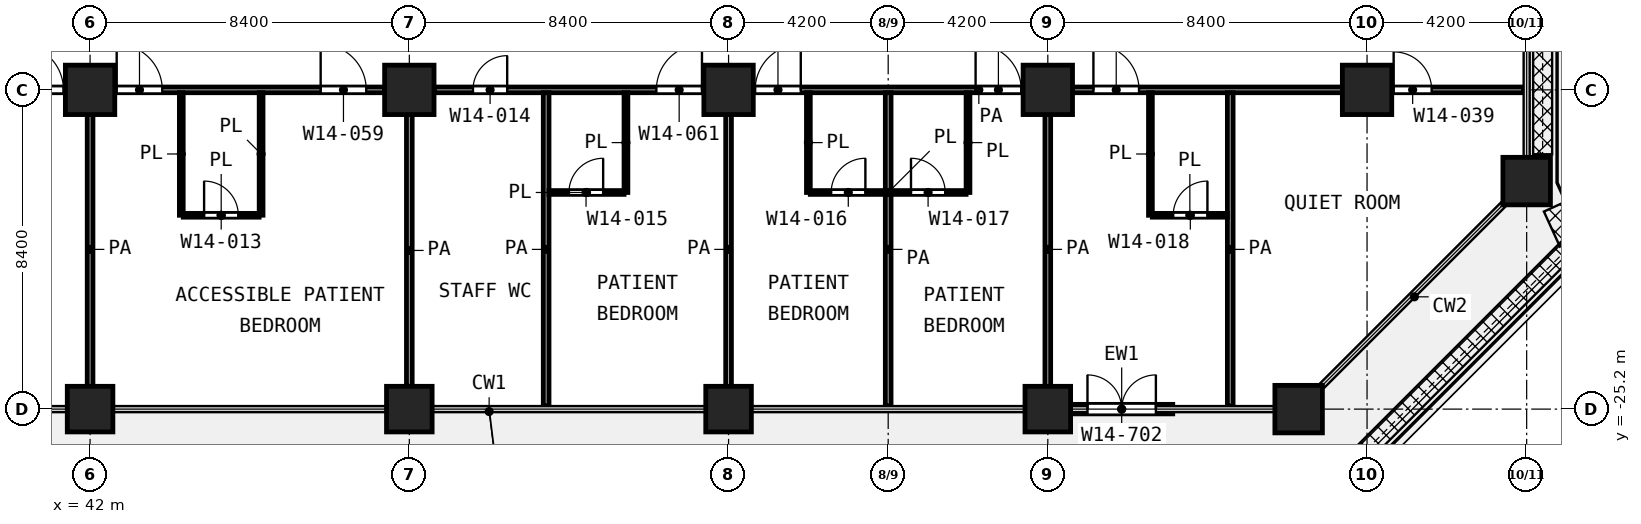
"""IFC4 building model, lengths in metres.
Left out: names, types, materials, properties, quantities, classifications, styles, units other than length and angle.
Written with IfcOpenShell. Run it as: python <this file> out.ifc"""

import sys

from ifc_helpers import new_model, si_unit, direction, frame, frame_2d, origin, origin_2d, place, context, subcontext, project, spatial, rectangle, extrude, element, fill, save


model = new_model("IFC4")
c1 = context("Model", 3, precision=1e-05, world=origin(), true_north=direction((0.0, 1.0)))
c2 = subcontext(c1, "Body", "Model", "MODEL_VIEW")
j1 = project(units=[si_unit("LENGTHUNIT", "METRE"), si_unit("PLANEANGLEUNIT", "RADIAN")], contexts=[c1])
p1 = place(None, origin())
s1 = spatial("IfcSite", under=j1, at=p1, CompositionType="ELEMENT")
p2 = place(p1, origin())
s2 = spatial("IfcBuilding", under=s1, at=p2, CompositionType="ELEMENT")
p3 = place(p2, frame((0.0, 0.0, 64.4)))
s3 = spatial("IfcBuildingStorey", under=s2, at=p3, CompositionType="ELEMENT", Elevation=64.4)
for number, where, z_axis, x_axis in (
    (1, (42.0, -16.8, 0.0), (0.0, 0.0, 1.0), (1.0, 0.0, 0.0)),
    (2, (50.4, -16.8, 0.0), (0.0, 0.0, 1.0), (1.0, 0.0, 0.0)),
    (3, (58.8, -16.8, 0.0), (0.0, 0.0, 1.0), (1.0, 0.0, 0.0)),
    (4, (67.2, -16.8, 0.0), (0.0, 0.0, 1.0), (1.0, 0.0, 0.0)),
    (5, (75.6, -16.8, 0.0), (0.0, 0.0, 1.0), (1.0, 0.0, 0.0)),
):
    element("IfcColumn", number, at=place(p3, frame(where, z_axis=z_axis, x_axis=x_axis)), inside=s3, PredefinedType="COLUMN", context=c2, shape_type="SweptSolid", body=[
        extrude(rectangle(XDim=1.3, YDim=1.3, at=origin_2d()), origin(), (0.0, 0.0, 1.0), 4.2),
    ])
p4 = place(p3, frame((79.8, -19.2, 0.0), z_axis=(0.0, 0.0, 1.0), x_axis=(1.0, 0.0, 0.0)))
e6 = element("IfcColumn", 6, at=p4, inside=s3, PredefinedType="COLUMN", context=c2, shape_type="SweptSolid", body=[
    extrude(rectangle(XDim=1.25, YDim=1.25, at=origin_2d()), origin(), (0.0, 0.0, 1.0), 4.2),
])
for number, where, z_axis, x_axis in (
    (7, (42.0, -25.2, 0.0), (0.0, 0.0, 1.0), (1.0, 0.0, 0.0)),
    (8, (50.4, -25.2, 0.0), (0.0, 0.0, 1.0), (1.0, 0.0, 0.0)),
    (9, (58.8, -25.2, 0.0), (0.0, 0.0, 1.0), (1.0, 0.0, 0.0)),
    (10, (67.2, -25.2, 0.0), (0.0, 0.0, 1.0), (1.0, 0.0, 0.0)),
):
    element("IfcColumn", number, at=place(p3, frame(where, z_axis=z_axis, x_axis=x_axis)), inside=s3, PredefinedType="COLUMN", context=c2, shape_type="SweptSolid", body=[
        extrude(rectangle(XDim=1.2, YDim=1.2, at=origin_2d()), origin(), (0.0, 0.0, 1.0), 4.2),
    ])
p5 = place(p3, frame((73.8, -25.2, 0.0), z_axis=(0.0, 0.0, 1.0), x_axis=(1.0, 0.0, 0.0)))
e11 = element("IfcColumn", 11, at=p5, inside=s3, PredefinedType="COLUMN", context=c2, shape_type="SweptSolid", body=[
    extrude(rectangle(XDim=1.25, YDim=1.25, at=origin_2d()), origin(), (0.0, 0.0, 1.0), 4.2),
])
p6 = place(p3, frame((67.8, -25.2, 0.0), z_axis=(0.0, 0.0, 1.0), x_axis=(1.0, 0.0, 0.0)))
e12 = element("IfcWall", 12, at=p6, inside=s3, PredefinedType="SOLIDWALL", context=c2, shape_type="SweptSolid", body=[
    extrude(rectangle(XDim=2.688, YDim=0.25, at=frame_2d((1.344, 0.0))), origin(), (0.0, 0.0, 1.0), 3.78),
])
p7 = place(p6, frame((0.444, 0.0, 0.0)))
e13 = element("IfcOpeningElement", 13, at=p7, cuts=e12, PredefinedType="OPENING", context=c2, shape_type="SweptSolid", body=[
    extrude(rectangle(XDim=1.8, YDim=2.1, at=frame_2d((0.9, 1.05))), frame((0.0, 0.135, 0.0), z_axis=(0.0, -1.0, 0.0), x_axis=(1.0, 0.0, 0.0)), (0.0, 0.0, 1.0), 0.27),
])
p8 = place(p3, frame((44.452, -20.1, 0.0), z_axis=(0.0, 0.0, 1.0), x_axis=(1.0, 0.0, 0.0)))
e14 = element("IfcWall", 14, at=p8, inside=s3, PredefinedType="PARTITIONING", context=c2, shape_type="SweptSolid", body=[
    extrude(rectangle(XDim=1.996, YDim=0.1, at=frame_2d((0.998, 0.0))), origin(), (0.0, 0.0, 1.0), 3.9),
])
p9 = place(p8, frame((0.548, 0.0, 0.0)))
e15 = element("IfcOpeningElement", 15, at=p9, cuts=e14, PredefinedType="OPENING", context=c2, shape_type="SweptSolid", body=[
    extrude(rectangle(XDim=0.9, YDim=2.1, at=frame_2d((0.45, 1.05))), frame((0.0, 0.06, 0.0), z_axis=(0.0, -1.0, 0.0), x_axis=(1.0, 0.0, 0.0)), (0.0, 0.0, 1.0), 0.12),
])
p10 = place(p3, frame((69.95, -20.1, 0.0), z_axis=(0.0, 0.0, 1.0), x_axis=(1.0, 0.0, 0.0)))
e16 = element("IfcWall", 16, at=p10, inside=s3, PredefinedType="PARTITIONING", context=c2, shape_type="SweptSolid", body=[
    extrude(rectangle(XDim=1.975, YDim=0.1, at=frame_2d((0.988, 0.0))), origin(), (0.0, 0.0, 1.0), 3.9),
])
p11 = place(p10, frame((0.55, 0.0, 0.0)))
e17 = element("IfcOpeningElement", 17, at=p11, cuts=e16, PredefinedType="OPENING", context=c2, shape_type="SweptSolid", body=[
    extrude(rectangle(XDim=0.9, YDim=2.1, at=frame_2d((0.45, 1.05))), frame((0.0, 0.06, 0.0), z_axis=(0.0, -1.0, 0.0), x_axis=(1.0, 0.0, 0.0)), (0.0, 0.0, 1.0), 0.12),
])
p12 = place(p3, frame((54.075, -19.5, 0.0), z_axis=(0.0, 0.0, 1.0), x_axis=(1.0, 0.0, 0.0)))
e18 = element("IfcWall", 18, at=p12, inside=s3, PredefinedType="PARTITIONING", context=c2, shape_type="SweptSolid", body=[
    extrude(rectangle(XDim=1.975, YDim=0.1, at=frame_2d((0.988, 0.0))), origin(), (0.0, 0.0, 1.0), 3.9),
])
p13 = place(p12, frame((0.525, 0.0, 0.0)))
e19 = element("IfcOpeningElement", 19, at=p13, cuts=e18, PredefinedType="OPENING", context=c2, shape_type="SweptSolid", body=[
    extrude(rectangle(XDim=0.9, YDim=2.1, at=frame_2d((0.45, 1.05))), frame((0.0, 0.06, 0.0), z_axis=(0.0, -1.0, 0.0), x_axis=(1.0, 0.0, 0.0)), (0.0, 0.0, 1.0), 0.12),
])
p14 = place(p3, frame((60.95, -19.5, 0.0), z_axis=(0.0, 0.0, 1.0), x_axis=(1.0, 0.0, 0.0)))
e20 = element("IfcWall", 20, at=p14, inside=s3, PredefinedType="PARTITIONING", context=c2, shape_type="SweptSolid", body=[
    extrude(rectangle(XDim=4.1, YDim=0.1, at=frame_2d((2.05, 0.0))), origin(), (0.0, 0.0, 1.0), 3.9),
])
p15 = place(p14, frame((0.55, 0.0, 0.0)))
e21 = element("IfcOpeningElement", 21, at=p15, cuts=e20, PredefinedType="OPENING", context=c2, shape_type="SweptSolid", body=[
    extrude(rectangle(XDim=0.9, YDim=2.1, at=frame_2d((0.45, 1.05))), frame((0.0, 0.06, 0.0), z_axis=(0.0, -1.0, 0.0), x_axis=(1.0, 0.0, 0.0)), (0.0, 0.0, 1.0), 0.12),
])
p16 = place(p14, frame((2.65, 0.0, 0.0)))
e22 = element("IfcOpeningElement", 22, at=p16, cuts=e20, PredefinedType="OPENING", context=c2, shape_type="SweptSolid", body=[
    extrude(rectangle(XDim=0.9, YDim=2.1, at=frame_2d((0.45, 1.05))), frame((0.0, 0.06, 0.0), z_axis=(0.0, -1.0, 0.0), x_axis=(1.0, 0.0, 0.0)), (0.0, 0.0, 1.0), 0.12),
])
p17 = place(p3, frame((44.4, -20.099, 0.0), z_axis=(0.0, 0.0, 1.0), x_axis=(0.0, 1.0, 0.0)))
e23 = element("IfcWall", 23, at=p17, inside=s3, PredefinedType="PARTITIONING", context=c2, shape_type="SweptSolid", body=[
    extrude(rectangle(XDim=3.224, YDim=0.1, at=frame_2d((1.612, 0.0))), origin(), (0.0, 0.0, 1.0), 3.9),
])
p18 = place(p3, frame((46.5, -20.098, 0.0), z_axis=(0.0, 0.0, 1.0), x_axis=(0.0, 1.0, 0.0)))
e24 = element("IfcWall", 24, at=p18, inside=s3, PredefinedType="PARTITIONING", context=c2, shape_type="SweptSolid", body=[
    extrude(rectangle(XDim=3.223, YDim=0.1, at=frame_2d((1.611, 0.0))), origin(), (0.0, 0.0, 1.0), 3.9),
])
for number, where, z_axis, x_axis in (
    (25, (56.1, -19.5, 0.0), (0.0, 0.0, 1.0), (0.0, 1.0, 0.0)),
    (26, (60.9, -19.5, 0.0), (0.0, 0.0, 1.0), (0.0, 1.0, 0.0)),
    (27, (65.1, -19.5, 0.0), (0.0, 0.0, 1.0), (0.0, 1.0, 0.0)),
):
    element("IfcWall", number, at=place(p3, frame(where, z_axis=z_axis, x_axis=x_axis)), inside=s3, PredefinedType="PARTITIONING", context=c2, shape_type="SweptSolid", body=[
        extrude(rectangle(XDim=2.625, YDim=0.1, at=frame_2d((1.312, 0.0))), origin(), (0.0, 0.0, 1.0), 3.9),
    ])
p19 = place(p3, frame((69.9, -20.1, 0.0), z_axis=(0.0, 0.0, 1.0), x_axis=(0.0, 1.0, 0.0)))
e28 = element("IfcWall", 28, at=p19, inside=s3, PredefinedType="PARTITIONING", context=c2, shape_type="SweptSolid", body=[
    extrude(rectangle(XDim=3.225, YDim=0.1, at=frame_2d((1.613, 0.0))), origin(), (0.0, 0.0, 1.0), 3.9),
])
p20 = place(p3, frame((25.1, -16.8, 0.0), z_axis=(0.0, 0.0, 1.0), x_axis=(1.0, 0.0, 0.0)))
e29 = element("IfcWall", 29, at=p20, inside=s3, PredefinedType="PARTITIONING", context=c2, shape_type="SweptSolid", body=[
    extrude(rectangle(XDim=24.65, YDim=0.15, at=frame_2d((12.325, 0.0))), origin(), (0.0, 0.0, 1.0), 3.9),
])
p21 = place(p20, frame((1.45, 0.0, 0.0)))
e30 = element("IfcOpeningElement", 30, at=p21, cuts=e29, PredefinedType="OPENING", context=c2, shape_type="SweptSolid", body=[
    extrude(rectangle(XDim=1.5, YDim=2.1, at=frame_2d((0.75, 1.05))), frame((0.0, 0.085, 0.0), z_axis=(0.0, -1.0, 0.0), x_axis=(1.0, 0.0, 0.0)), (0.0, 0.0, 1.0), 0.17),
])
p22 = place(p20, frame((5.9, 0.0, 0.0)))
e31 = element("IfcOpeningElement", 31, at=p22, cuts=e29, PredefinedType="OPENING", context=c2, shape_type="SweptSolid", body=[
    extrude(rectangle(XDim=1.0, YDim=2.1, at=frame_2d((0.5, 1.05))), frame((0.0, 0.085, 0.0), z_axis=(0.0, -1.0, 0.0), x_axis=(1.0, 0.0, 0.0)), (0.0, 0.0, 1.0), 0.17),
])
p23 = place(p20, frame((9.2, 0.0, 0.0)))
e32 = element("IfcOpeningElement", 32, at=p23, cuts=e29, PredefinedType="OPENING", context=c2, shape_type="SweptSolid", body=[
    extrude(rectangle(XDim=1.2, YDim=2.1, at=frame_2d((0.6, 1.05))), frame((0.0, 0.085, 0.0), z_axis=(0.0, -1.0, 0.0), x_axis=(1.0, 0.0, 0.0)), (0.0, 0.0, 1.0), 0.17),
])
p24 = place(p20, frame((15.0, 0.0, 0.0)))
e33 = element("IfcOpeningElement", 33, at=p24, cuts=e29, PredefinedType="OPENING", context=c2, shape_type="SweptSolid", body=[
    extrude(rectangle(XDim=1.2, YDim=2.1, at=frame_2d((0.6, 1.05))), frame((0.0, 0.085, 0.0), z_axis=(0.0, -1.0, 0.0), x_axis=(1.0, 0.0, 0.0)), (0.0, 0.0, 1.0), 0.17),
])
p25 = place(p20, frame((22.967, 0.0, 0.0)))
e34 = element("IfcOpeningElement", 34, at=p25, cuts=e29, PredefinedType="OPENING", context=c2, shape_type="SweptSolid", body=[
    extrude(rectangle(XDim=1.2, YDim=2.1, at=frame_2d((0.6, 1.05))), frame((0.0, 0.085, 0.0), z_axis=(0.0, -1.0, 0.0), x_axis=(1.0, 0.0, 0.0)), (0.0, 0.0, 1.0), 0.17),
])
p26 = place(p20, frame((17.6, 0.0, 0.0)))
e35 = element("IfcOpeningElement", 35, at=p26, cuts=e29, PredefinedType="OPENING", context=c2, shape_type="SweptSolid", body=[
    extrude(rectangle(XDim=1.2, YDim=2.1, at=frame_2d((0.6, 1.05))), frame((0.0, 0.085, 0.0), z_axis=(0.0, -1.0, 0.0), x_axis=(1.0, 0.0, 0.0)), (0.0, 0.0, 1.0), 0.17),
])
p27 = place(p3, frame((51.05, -16.8, 0.0), z_axis=(0.0, 0.0, 1.0), x_axis=(1.0, 0.0, 0.0)))
e36 = element("IfcWall", 36, at=p27, inside=s3, PredefinedType="PARTITIONING", context=c2, shape_type="SweptSolid", body=[
    extrude(rectangle(XDim=28.67, YDim=0.15, at=frame_2d((14.335, 0.0))), origin(), (0.0, 0.0, 1.0), 3.9),
])
p28 = place(p27, frame((1.025, 0.0, 0.0)))
e37 = element("IfcOpeningElement", 37, at=p28, cuts=e36, PredefinedType="OPENING", context=c2, shape_type="SweptSolid", body=[
    extrude(rectangle(XDim=0.9, YDim=2.1, at=frame_2d((0.45, 1.05))), frame((0.0, 0.085, 0.0), z_axis=(0.0, -1.0, 0.0), x_axis=(1.0, 0.0, 0.0)), (0.0, 0.0, 1.0), 0.17),
])
p29 = place(p27, frame((5.85, 0.0, 0.0)))
e38 = element("IfcOpeningElement", 38, at=p29, cuts=e36, PredefinedType="OPENING", context=c2, shape_type="SweptSolid", body=[
    extrude(rectangle(XDim=1.2, YDim=2.1, at=frame_2d((0.6, 1.05))), frame((0.0, 0.085, 0.0), z_axis=(0.0, -1.0, 0.0), x_axis=(1.0, 0.0, 0.0)), (0.0, 0.0, 1.0), 0.17),
])
p30 = place(p27, frame((8.45, 0.0, 0.0)))
e39 = element("IfcOpeningElement", 39, at=p30, cuts=e36, PredefinedType="OPENING", context=c2, shape_type="SweptSolid", body=[
    extrude(rectangle(XDim=1.2, YDim=2.1, at=frame_2d((0.6, 1.05))), frame((0.0, 0.085, 0.0), z_axis=(0.0, -1.0, 0.0), x_axis=(1.0, 0.0, 0.0)), (0.0, 0.0, 1.0), 0.17),
])
p31 = place(p27, frame((14.25, 0.0, 0.0)))
e40 = element("IfcOpeningElement", 40, at=p31, cuts=e36, PredefinedType="OPENING", context=c2, shape_type="SweptSolid", body=[
    extrude(rectangle(XDim=1.2, YDim=2.1, at=frame_2d((0.6, 1.05))), frame((0.0, 0.085, 0.0), z_axis=(0.0, -1.0, 0.0), x_axis=(1.0, 0.0, 0.0)), (0.0, 0.0, 1.0), 0.17),
])
p32 = place(p27, frame((17.35, 0.0, 0.0)))
e41 = element("IfcOpeningElement", 41, at=p32, cuts=e36, PredefinedType="OPENING", context=c2, shape_type="SweptSolid", body=[
    extrude(rectangle(XDim=1.2, YDim=2.1, at=frame_2d((0.6, 1.05))), frame((0.0, 0.085, 0.0), z_axis=(0.0, -1.0, 0.0), x_axis=(1.0, 0.0, 0.0)), (0.0, 0.0, 1.0), 0.17),
])
p33 = place(p27, frame((25.25, 0.0, 0.0)))
e42 = element("IfcOpeningElement", 42, at=p33, cuts=e36, PredefinedType="OPENING", context=c2, shape_type="SweptSolid", body=[
    extrude(rectangle(XDim=1.0, YDim=2.1, at=frame_2d((0.5, 1.05))), frame((0.0, 0.085, 0.0), z_axis=(0.0, -1.0, 0.0), x_axis=(1.0, 0.0, 0.0)), (0.0, 0.0, 1.0), 0.17),
])
p34 = place(p3, frame((42.0, -25.12, 0.0), z_axis=(0.0, 0.0, 1.0), x_axis=(0.0, 1.0, 0.0)))
e43 = element("IfcWall", 43, at=p34, inside=s3, PredefinedType="PARTITIONING", context=c2, shape_type="SweptSolid", body=[
    extrude(rectangle(XDim=8.245, YDim=0.15, at=frame_2d((4.123, 0.0))), origin(), (0.0, 0.0, 1.0), 3.9),
])
p35 = place(p3, frame((50.4, -24.6, 0.0), z_axis=(0.0, 0.0, 1.0), x_axis=(0.0, 1.0, 0.0)))
e44 = element("IfcWall", 44, at=p35, inside=s3, PredefinedType="PARTITIONING", context=c2, shape_type="SweptSolid", body=[
    extrude(rectangle(XDim=7.15, YDim=0.15, at=frame_2d((3.575, 0.0))), origin(), (0.0, 0.0, 1.0), 3.9),
])
for number, where, z_axis, x_axis in (
    (45, (54.0, -25.12, 0.0), (0.0, 0.0, 1.0), (0.0, 1.0, 0.0)),
    (46, (58.8, -25.12, 0.0), (0.0, 0.0, 1.0), (0.0, 1.0, 0.0)),
    (47, (63.0, -25.12, 0.0), (0.0, 0.0, 1.0), (0.0, 1.0, 0.0)),
    (48, (67.2, -25.12, 0.0), (0.0, 0.0, 1.0), (0.0, 1.0, 0.0)),
    (49, (72.0, -25.12, 0.0), (0.0, 0.0, 1.0), (0.0, 1.0, 0.0)),
):
    element("IfcWall", number, at=place(p3, frame(where, z_axis=z_axis, x_axis=x_axis)), inside=s3, PredefinedType="PARTITIONING", context=c2, shape_type="SweptSolid", body=[
        extrude(rectangle(XDim=8.245, YDim=0.15, at=frame_2d((4.123, 0.0))), origin(), (0.0, 0.0, 1.0), 3.9),
    ])
p36 = place(p7, origin())
e50 = element("IfcDoor", 50, at=p36, inside=s3, OperationType="DOUBLE_DOOR_SINGLE_SWING", PredefinedType="DOOR", context=c2, shape_type="SweptSolid", body=[
    extrude(rectangle(XDim=1.8, YDim=2.1, at=frame_2d((0.9, 1.05))), frame((0.0, 0.025, 0.0), z_axis=(0.0, -1.0, 0.0), x_axis=(1.0, 0.0, 0.0)), (0.0, 0.0, 1.0), 0.05),
])
fill(e13, e50)
p37 = place(p24, origin())
e51 = element("IfcDoor", 51, at=p37, inside=s3, OperationType="SINGLE_SWING_LEFT", PredefinedType="DOOR", context=c2, shape_type="SweptSolid", body=[
    extrude(rectangle(XDim=1.2, YDim=2.1, at=frame_2d((0.6, 1.05))), frame((0.0, 0.025, 0.0), z_axis=(0.0, -1.0, 0.0), x_axis=(1.0, 0.0, 0.0)), (0.0, 0.0, 1.0), 0.05),
])
fill(e33, e51)
p38 = place(p25, origin())
e52 = element("IfcDoor", 52, at=p38, inside=s3, OperationType="SINGLE_SWING_LEFT", PredefinedType="DOOR", context=c2, shape_type="SweptSolid", body=[
    extrude(rectangle(XDim=1.2, YDim=2.1, at=frame_2d((0.6, 1.05))), frame((0.0, 0.025, 0.0), z_axis=(0.0, -1.0, 0.0), x_axis=(1.0, 0.0, 0.0)), (0.0, 0.0, 1.0), 0.05),
])
fill(e34, e52)
p39 = place(p26, origin())
e53 = element("IfcDoor", 53, at=p39, inside=s3, OperationType="SINGLE_SWING_LEFT", PredefinedType="DOOR", context=c2, shape_type="SweptSolid", body=[
    extrude(rectangle(XDim=1.2, YDim=2.1, at=frame_2d((0.6, 1.05))), frame((0.0, 0.025, 0.0), z_axis=(0.0, -1.0, 0.0), x_axis=(1.0, 0.0, 0.0)), (0.0, 0.0, 1.0), 0.05),
])
fill(e35, e53)
p40 = place(p9, origin())
e54 = element("IfcDoor", 54, at=p40, inside=s3, OperationType="SINGLE_SWING_LEFT", PredefinedType="DOOR", context=c2, shape_type="SweptSolid", body=[
    extrude(rectangle(XDim=0.9, YDim=2.1, at=frame_2d((0.45, 1.05))), frame((0.0, 0.025, 0.0), z_axis=(0.0, -1.0, 0.0), x_axis=(1.0, 0.0, 0.0)), (0.0, 0.0, 1.0), 0.05),
])
fill(e15, e54)
p41 = place(p28, origin())
e55 = element("IfcDoor", 55, at=p41, inside=s3, OperationType="SINGLE_SWING_RIGHT", PredefinedType="DOOR", context=c2, shape_type="SweptSolid", body=[
    extrude(rectangle(XDim=0.9, YDim=2.1, at=frame_2d((0.45, 1.05))), frame((0.0, 0.025, 0.0), z_axis=(0.0, -1.0, 0.0), x_axis=(1.0, 0.0, 0.0)), (0.0, 0.0, 1.0), 0.05),
])
fill(e37, e55)
p42 = place(p29, origin())
e56 = element("IfcDoor", 56, at=p42, inside=s3, OperationType="SINGLE_SWING_RIGHT", PredefinedType="DOOR", context=c2, shape_type="SweptSolid", body=[
    extrude(rectangle(XDim=1.2, YDim=2.1, at=frame_2d((0.6, 1.05))), frame((0.0, 0.025, 0.0), z_axis=(0.0, -1.0, 0.0), x_axis=(1.0, 0.0, 0.0)), (0.0, 0.0, 1.0), 0.05),
])
fill(e38, e56)
p43 = place(p13, origin())
e57 = element("IfcDoor", 57, at=p43, inside=s3, OperationType="SINGLE_SWING_RIGHT", PredefinedType="DOOR", context=c2, shape_type="SweptSolid", body=[
    extrude(rectangle(XDim=0.9, YDim=2.1, at=frame_2d((0.45, 1.05))), frame((0.0, 0.025, 0.0), z_axis=(0.0, -1.0, 0.0), x_axis=(1.0, 0.0, 0.0)), (0.0, 0.0, 1.0), 0.05),
])
fill(e19, e57)
p44 = place(p30, origin())
e58 = element("IfcDoor", 58, at=p44, inside=s3, OperationType="SINGLE_SWING_RIGHT", PredefinedType="DOOR", context=c2, shape_type="SweptSolid", body=[
    extrude(rectangle(XDim=1.2, YDim=2.1, at=frame_2d((0.6, 1.05))), frame((0.0, 0.025, 0.0), z_axis=(0.0, -1.0, 0.0), x_axis=(1.0, 0.0, 0.0)), (0.0, 0.0, 1.0), 0.05),
])
fill(e39, e58)
p45 = place(p15, origin())
e59 = element("IfcDoor", 59, at=p45, inside=s3, OperationType="SINGLE_SWING_RIGHT", PredefinedType="DOOR", context=c2, shape_type="SweptSolid", body=[
    extrude(rectangle(XDim=0.9, YDim=2.1, at=frame_2d((0.45, 1.05))), frame((0.0, 0.025, 0.0), z_axis=(0.0, -1.0, 0.0), x_axis=(1.0, 0.0, 0.0)), (0.0, 0.0, 1.0), 0.05),
])
fill(e21, e59)
p46 = place(p31, origin())
e60 = element("IfcDoor", 60, at=p46, inside=s3, OperationType="SINGLE_SWING_LEFT", PredefinedType="DOOR", context=c2, shape_type="SweptSolid", body=[
    extrude(rectangle(XDim=1.2, YDim=2.1, at=frame_2d((0.6, 1.05))), frame((0.0, 0.025, 0.0), z_axis=(0.0, -1.0, 0.0), x_axis=(1.0, 0.0, 0.0)), (0.0, 0.0, 1.0), 0.05),
])
fill(e40, e60)
p47 = place(p16, origin())
e61 = element("IfcDoor", 61, at=p47, inside=s3, OperationType="SINGLE_SWING_LEFT", PredefinedType="DOOR", context=c2, shape_type="SweptSolid", body=[
    extrude(rectangle(XDim=0.9, YDim=2.1, at=frame_2d((0.45, 1.05))), frame((0.0, 0.025, 0.0), z_axis=(0.0, -1.0, 0.0), x_axis=(1.0, 0.0, 0.0)), (0.0, 0.0, 1.0), 0.05),
])
fill(e22, e61)
p48 = place(p32, origin())
e62 = element("IfcDoor", 62, at=p48, inside=s3, OperationType="SINGLE_SWING_LEFT", PredefinedType="DOOR", context=c2, shape_type="SweptSolid", body=[
    extrude(rectangle(XDim=1.2, YDim=2.1, at=frame_2d((0.6, 1.05))), frame((0.0, 0.025, 0.0), z_axis=(0.0, -1.0, 0.0), x_axis=(1.0, 0.0, 0.0)), (0.0, 0.0, 1.0), 0.05),
])
fill(e41, e62)
p49 = place(p11, origin())
e63 = element("IfcDoor", 63, at=p49, inside=s3, OperationType="SINGLE_SWING_RIGHT", PredefinedType="DOOR", context=c2, shape_type="SweptSolid", body=[
    extrude(rectangle(XDim=0.9, YDim=2.1, at=frame_2d((0.45, 1.05))), frame((0.0, 0.025, 0.0), z_axis=(0.0, -1.0, 0.0), x_axis=(1.0, 0.0, 0.0)), (0.0, 0.0, 1.0), 0.05),
])
fill(e17, e63)
p50 = place(p33, origin())
e64 = element("IfcDoor", 64, at=p50, inside=s3, OperationType="SINGLE_SWING_LEFT", PredefinedType="DOOR", context=c2, shape_type="SweptSolid", body=[
    extrude(rectangle(XDim=1.0, YDim=2.1, at=frame_2d((0.5, 1.05))), frame((0.0, 0.025, 0.0), z_axis=(0.0, -1.0, 0.0), x_axis=(1.0, 0.0, 0.0)), (0.0, 0.0, 1.0), 0.05),
])
fill(e42, e64)
save(model, sys.argv[1])
